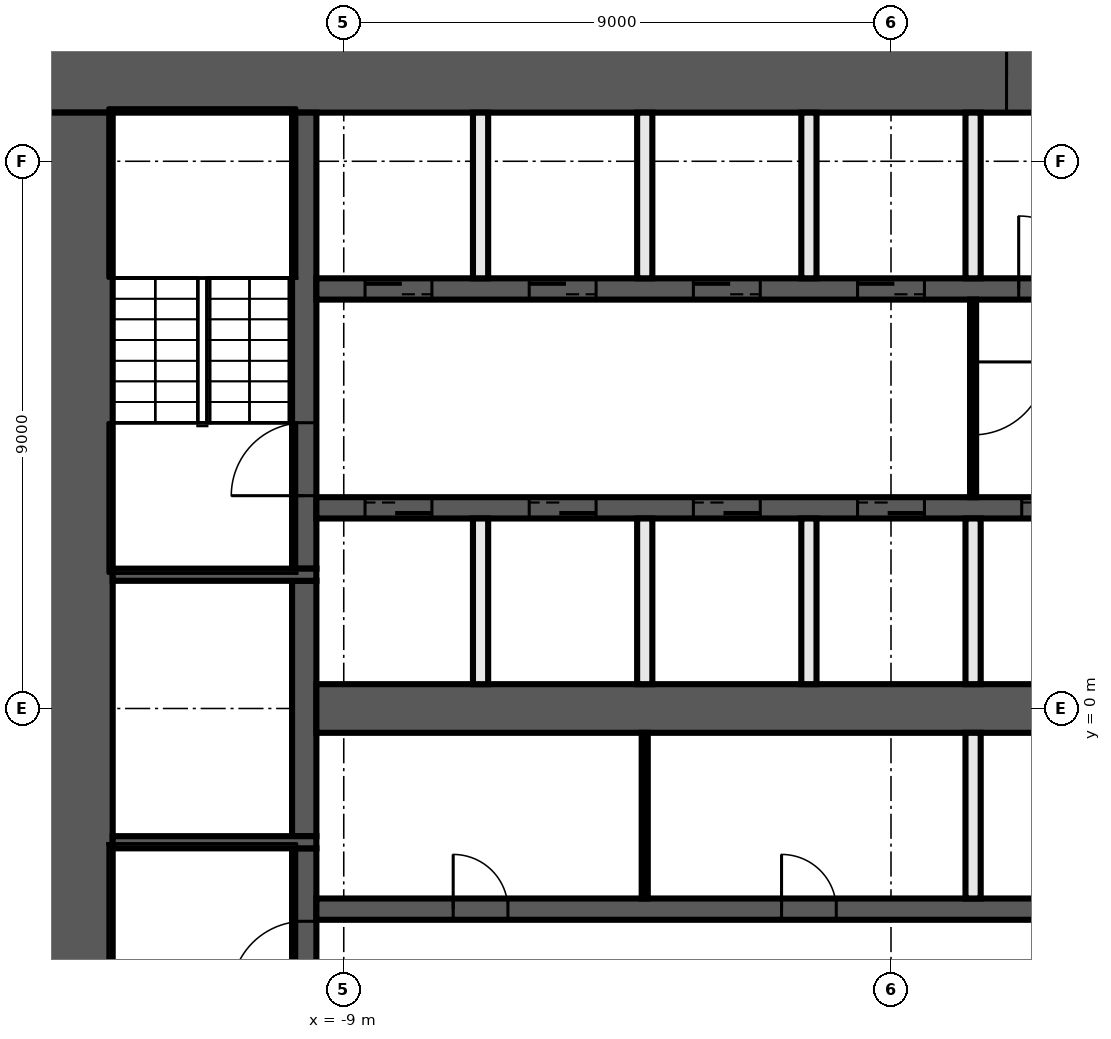
"""IFC4 building model, lengths in metres.
Left out: names, types, materials, properties, quantities, classifications, styles, units other than length and angle.
Written with IfcOpenShell. Run it as: python <this file> out.ifc"""

import sys

from ifc_helpers import new_model, si_unit, direction, frame, frame_2d, origin, place, context, subcontext, project, spatial, rectangle, extrude, element, fill, save


model = new_model("IFC4")
c1 = context("Model", 3, precision=1e-05, world=origin(), true_north=direction((0.0, 1.0)))
c2 = subcontext(c1, "Body", "Model", "MODEL_VIEW")
j1 = project(units=[si_unit("LENGTHUNIT", "METRE"), si_unit("PLANEANGLEUNIT", "RADIAN")], contexts=[c1])
p1 = place(None, origin())
s1 = spatial("IfcSite", under=j1, at=p1, CompositionType="ELEMENT")
p2 = place(p1, origin())
s2 = spatial("IfcBuilding", under=s1, at=p2, CompositionType="ELEMENT")
p3 = place(p2, frame((0.0, 0.0, 19.0)))
s3 = spatial("IfcBuildingStorey", under=s2, at=p3, CompositionType="ELEMENT", Elevation=19.0)
p4 = place(p3, frame((-14.0, 10.4, 0.0), z_axis=(0.0, 0.0, 1.0), x_axis=(1.0, 0.0, 0.0)))
e1 = element("IfcWall", 1, at=p4, inside=s3, PredefinedType="SHEAR", context=c2, shape_type="SweptSolid", body=[
    extrude(rectangle(XDim=28.0, YDim=1.2, at=frame_2d((14.0, 0.0))), origin(), (0.0, 0.0, 1.0), 7.55),
])
p5 = place(p4, frame((15.9, 0.0, 0.0)))
e2 = element("IfcOpeningElement", 2, at=p5, cuts=e1, PredefinedType="OPENING", context=c2, shape_type="SweptSolid", body=[
    extrude(rectangle(XDim=1.6, YDim=2.1, at=frame_2d((0.8, 1.05))), frame((0.0, 0.61, 0.0), z_axis=(0.0, -1.0, 0.0), x_axis=(1.0, 0.0, 0.0)), (0.0, 0.0, 1.0), 1.22),
])
p6 = place(p3, frame((-13.4, -9.8, 0.0), z_axis=(0.0, 0.0, 1.0), x_axis=(0.0, 1.0, 0.0)))
e3 = element("IfcWall", 3, at=p6, inside=s3, PredefinedType="SHEAR", context=c2, shape_type="SweptSolid", body=[
    extrude(rectangle(XDim=19.6, YDim=1.2, at=frame_2d((9.8, 0.0))), origin(), (0.0, 0.0, 1.0), 7.55),
])
p7 = place(p3, frame((-9.65, -9.8, 0.0), z_axis=(0.0, 0.0, 1.0), x_axis=(0.0, 1.0, 0.0)))
e4 = element("IfcWall", 4, at=p7, inside=s3, PredefinedType="SHEAR", context=c2, shape_type="SweptSolid", body=[
    extrude(rectangle(XDim=7.5, YDim=0.4, at=frame_2d((3.75, 0.0))), origin(), (0.0, 0.0, 1.0), 7.55),
])
p8 = place(p7, frame((5.1, 0.0, 0.0)))
e5 = element("IfcOpeningElement", 5, at=p8, cuts=e4, PredefinedType="OPENING", context=c2, shape_type="SweptSolid", body=[
    extrude(rectangle(XDim=1.2, YDim=2.1, at=frame_2d((0.6, 1.05))), frame((0.0, 0.21, 0.0), z_axis=(0.0, -1.0, 0.0), x_axis=(1.0, 0.0, 0.0)), (0.0, 0.0, 1.0), 0.42),
])
p9 = place(p3, frame((-9.65, -2.1, 0.0), z_axis=(0.0, 0.0, 1.0), x_axis=(0.0, 1.0, 0.0)))
e6 = element("IfcWall", 6, at=p9, inside=s3, PredefinedType="SHEAR", context=c2, shape_type="SweptSolid", body=[
    extrude(rectangle(XDim=4.2, YDim=0.4, at=frame_2d((2.1, 0.0))), origin(), (0.0, 0.0, 1.0), 7.55),
])
p10 = place(p3, frame((-9.65, 2.3, 0.0), z_axis=(0.0, 0.0, 1.0), x_axis=(0.0, 1.0, 0.0)))
e7 = element("IfcWall", 7, at=p10, inside=s3, PredefinedType="SHEAR", context=c2, shape_type="SweptSolid", body=[
    extrude(rectangle(XDim=7.5, YDim=0.4, at=frame_2d((3.75, 0.0))), origin(), (0.0, 0.0, 1.0), 7.55),
])
p11 = place(p10, frame((1.2, 0.0, 0.0)))
e8 = element("IfcOpeningElement", 8, at=p11, cuts=e7, PredefinedType="OPENING", context=c2, shape_type="SweptSolid", body=[
    extrude(rectangle(XDim=1.2, YDim=2.1, at=frame_2d((0.6, 1.05))), frame((0.0, 0.21, 0.0), z_axis=(0.0, -1.0, 0.0), x_axis=(1.0, 0.0, 0.0)), (0.0, 0.0, 1.0), 0.42),
])
for number, where, z_axis, x_axis in (
    (9, (-9.45, 2.2, 0.0), (0.0, 0.0, 1.0), (-1.0, 0.0, 0.0)),
    (10, (-9.45, -2.2, 0.0), (0.0, 0.0, 1.0), (-1.0, 0.0, 0.0)),
):
    element("IfcWall", number, at=place(p3, frame(where, z_axis=z_axis, x_axis=x_axis)), inside=s3, PredefinedType="SHEAR", context=c2, shape_type="SweptSolid", body=[
        extrude(rectangle(XDim=3.35, YDim=0.2, at=frame_2d((1.675, 0.0))), origin(), (0.0, 0.0, 1.0), 7.55),
    ])
p12 = place(p3, frame((-9.45, 6.9, 0.0), z_axis=(0.0, 0.0, 1.0), x_axis=(1.0, 0.0, 0.0)))
e11 = element("IfcWall", 11, at=p12, inside=s3, PredefinedType="SHEAR", context=c2, shape_type="SweptSolid", body=[
    extrude(rectangle(XDim=18.9, YDim=0.35, at=frame_2d((9.45, 0.0))), origin(), (0.0, 0.0, 1.0), 7.55),
])
p13 = place(p12, frame((0.8, 0.0, 0.0)))
e12 = element("IfcOpeningElement", 12, at=p13, cuts=e11, PredefinedType="OPENING", context=c2, shape_type="SweptSolid", body=[
    extrude(rectangle(XDim=1.1, YDim=2.1, at=frame_2d((0.55, 1.05))), frame((0.0, 0.185, 0.0), z_axis=(0.0, -1.0, 0.0), x_axis=(1.0, 0.0, 0.0)), (0.0, 0.0, 1.0), 0.37),
])
p14 = place(p12, frame((3.5, 0.0, 0.0)))
e13 = element("IfcOpeningElement", 13, at=p14, cuts=e11, PredefinedType="OPENING", context=c2, shape_type="SweptSolid", body=[
    extrude(rectangle(XDim=1.1, YDim=2.1, at=frame_2d((0.55, 1.05))), frame((0.0, 0.185, 0.0), z_axis=(0.0, -1.0, 0.0), x_axis=(1.0, 0.0, 0.0)), (0.0, 0.0, 1.0), 0.37),
])
p15 = place(p12, frame((6.2, 0.0, 0.0)))
e14 = element("IfcOpeningElement", 14, at=p15, cuts=e11, PredefinedType="OPENING", context=c2, shape_type="SweptSolid", body=[
    extrude(rectangle(XDim=1.1, YDim=2.1, at=frame_2d((0.55, 1.05))), frame((0.0, 0.185, 0.0), z_axis=(0.0, -1.0, 0.0), x_axis=(1.0, 0.0, 0.0)), (0.0, 0.0, 1.0), 0.37),
])
p16 = place(p12, frame((8.9, 0.0, 0.0)))
e15 = element("IfcOpeningElement", 15, at=p16, cuts=e11, PredefinedType="OPENING", context=c2, shape_type="SweptSolid", body=[
    extrude(rectangle(XDim=1.1, YDim=2.1, at=frame_2d((0.55, 1.05))), frame((0.0, 0.185, 0.0), z_axis=(0.0, -1.0, 0.0), x_axis=(1.0, 0.0, 0.0)), (0.0, 0.0, 1.0), 0.37),
])
p17 = place(p12, frame((11.55, 0.0, 0.0)))
e16 = element("IfcOpeningElement", 16, at=p17, cuts=e11, PredefinedType="OPENING", context=c2, shape_type="SweptSolid", body=[
    extrude(rectangle(XDim=1.2, YDim=2.1, at=frame_2d((0.6, 1.05))), frame((0.0, 0.185, 0.0), z_axis=(0.0, -1.0, 0.0), x_axis=(1.0, 0.0, 0.0)), (0.0, 0.0, 1.0), 0.37),
])
p18 = place(p12, frame((14.3, 0.0, 0.0)))
e17 = element("IfcOpeningElement", 17, at=p18, cuts=e11, PredefinedType="OPENING", context=c2, shape_type="SweptSolid", body=[
    extrude(rectangle(XDim=1.1, YDim=2.1, at=frame_2d((0.55, 1.05))), frame((0.0, 0.185, 0.0), z_axis=(0.0, -1.0, 0.0), x_axis=(1.0, 0.0, 0.0)), (0.0, 0.0, 1.0), 0.37),
])
p19 = place(p12, frame((17.0, 0.0, 0.0)))
e18 = element("IfcOpeningElement", 18, at=p19, cuts=e11, PredefinedType="OPENING", context=c2, shape_type="SweptSolid", body=[
    extrude(rectangle(XDim=1.1, YDim=2.1, at=frame_2d((0.55, 1.05))), frame((0.0, 0.185, 0.0), z_axis=(0.0, -1.0, 0.0), x_axis=(1.0, 0.0, 0.0)), (0.0, 0.0, 1.0), 0.37),
])
p20 = place(p3, frame((9.45, 3.3, 0.0), z_axis=(0.0, 0.0, 1.0), x_axis=(-1.0, 0.0, 0.0)))
e19 = element("IfcWall", 19, at=p20, inside=s3, PredefinedType="SHEAR", context=c2, shape_type="SweptSolid", body=[
    extrude(rectangle(XDim=18.9, YDim=0.35, at=frame_2d((9.45, 0.0))), origin(), (0.0, 0.0, 1.0), 7.55),
])
p21 = place(p20, frame((17.0, 0.0, 0.0)))
e20 = element("IfcOpeningElement", 20, at=p21, cuts=e19, PredefinedType="OPENING", context=c2, shape_type="SweptSolid", body=[
    extrude(rectangle(XDim=1.1, YDim=2.1, at=frame_2d((0.55, 1.05))), frame((0.0, 0.185, 0.0), z_axis=(0.0, -1.0, 0.0), x_axis=(1.0, 0.0, 0.0)), (0.0, 0.0, 1.0), 0.37),
])
p22 = place(p20, frame((14.3, 0.0, 0.0)))
e21 = element("IfcOpeningElement", 21, at=p22, cuts=e19, PredefinedType="OPENING", context=c2, shape_type="SweptSolid", body=[
    extrude(rectangle(XDim=1.1, YDim=2.1, at=frame_2d((0.55, 1.05))), frame((0.0, 0.185, 0.0), z_axis=(0.0, -1.0, 0.0), x_axis=(1.0, 0.0, 0.0)), (0.0, 0.0, 1.0), 0.37),
])
p23 = place(p20, frame((11.6, 0.0, 0.0)))
e22 = element("IfcOpeningElement", 22, at=p23, cuts=e19, PredefinedType="OPENING", context=c2, shape_type="SweptSolid", body=[
    extrude(rectangle(XDim=1.1, YDim=2.1, at=frame_2d((0.55, 1.05))), frame((0.0, 0.185, 0.0), z_axis=(0.0, -1.0, 0.0), x_axis=(1.0, 0.0, 0.0)), (0.0, 0.0, 1.0), 0.37),
])
p24 = place(p20, frame((8.9, 0.0, 0.0)))
e23 = element("IfcOpeningElement", 23, at=p24, cuts=e19, PredefinedType="OPENING", context=c2, shape_type="SweptSolid", body=[
    extrude(rectangle(XDim=1.1, YDim=2.1, at=frame_2d((0.55, 1.05))), frame((0.0, 0.185, 0.0), z_axis=(0.0, -1.0, 0.0), x_axis=(1.0, 0.0, 0.0)), (0.0, 0.0, 1.0), 0.37),
])
p25 = place(p20, frame((6.2, 0.0, 0.0)))
e24 = element("IfcOpeningElement", 24, at=p25, cuts=e19, PredefinedType="OPENING", context=c2, shape_type="SweptSolid", body=[
    extrude(rectangle(XDim=1.1, YDim=2.1, at=frame_2d((0.55, 1.05))), frame((0.0, 0.185, 0.0), z_axis=(0.0, -1.0, 0.0), x_axis=(1.0, 0.0, 0.0)), (0.0, 0.0, 1.0), 0.37),
])
p26 = place(p20, frame((3.5, 0.0, 0.0)))
e25 = element("IfcOpeningElement", 25, at=p26, cuts=e19, PredefinedType="OPENING", context=c2, shape_type="SweptSolid", body=[
    extrude(rectangle(XDim=1.1, YDim=2.1, at=frame_2d((0.55, 1.05))), frame((0.0, 0.185, 0.0), z_axis=(0.0, -1.0, 0.0), x_axis=(1.0, 0.0, 0.0)), (0.0, 0.0, 1.0), 0.37),
])
p27 = place(p20, frame((0.9, 0.0, 0.0)))
e26 = element("IfcOpeningElement", 26, at=p27, cuts=e19, PredefinedType="OPENING", context=c2, shape_type="SweptSolid", body=[
    extrude(rectangle(XDim=0.9, YDim=2.1, at=frame_2d((0.45, 1.05))), frame((0.0, 0.185, 0.0), z_axis=(0.0, -1.0, 0.0), x_axis=(1.0, 0.0, 0.0)), (0.0, 0.0, 1.0), 0.37),
])
p28 = place(p3, frame((-9.45, -3.3, 0.0), z_axis=(0.0, 0.0, 1.0), x_axis=(1.0, 0.0, 0.0)))
e27 = element("IfcWall", 27, at=p28, inside=s3, PredefinedType="SHEAR", context=c2, shape_type="SweptSolid", body=[
    extrude(rectangle(XDim=18.9, YDim=0.35, at=frame_2d((9.45, 0.0))), origin(), (0.0, 0.0, 1.0), 7.55),
])
p29 = place(p28, frame((17.0, 0.0, 0.0)))
e28 = element("IfcOpeningElement", 28, at=p29, cuts=e27, PredefinedType="OPENING", context=c2, shape_type="SweptSolid", body=[
    extrude(rectangle(XDim=1.1, YDim=2.1, at=frame_2d((0.55, 1.05))), frame((0.0, 0.185, 0.0), z_axis=(0.0, -1.0, 0.0), x_axis=(1.0, 0.0, 0.0)), (0.0, 0.0, 1.0), 0.37),
])
p30 = place(p28, frame((2.25, 0.0, 0.0)))
e29 = element("IfcOpeningElement", 29, at=p30, cuts=e27, PredefinedType="OPENING", context=c2, shape_type="SweptSolid", body=[
    extrude(rectangle(XDim=0.9, YDim=2.1, at=frame_2d((0.45, 1.05))), frame((0.0, 0.185, 0.0), z_axis=(0.0, -1.0, 0.0), x_axis=(1.0, 0.0, 0.0)), (0.0, 0.0, 1.0), 0.37),
])
p31 = place(p28, frame((7.65, 0.0, 0.0)))
e30 = element("IfcOpeningElement", 30, at=p31, cuts=e27, PredefinedType="OPENING", context=c2, shape_type="SweptSolid", body=[
    extrude(rectangle(XDim=0.9, YDim=2.1, at=frame_2d((0.45, 1.05))), frame((0.0, 0.185, 0.0), z_axis=(0.0, -1.0, 0.0), x_axis=(1.0, 0.0, 0.0)), (0.0, 0.0, 1.0), 0.37),
])
p32 = place(p3, frame((-9.45, 0.0, 0.0), z_axis=(0.0, 0.0, 1.0), x_axis=(1.0, 0.0, 0.0)))
e31 = element("IfcWall", 31, at=p32, inside=s3, PredefinedType="SHEAR", context=c2, shape_type="SweptSolid", body=[
    extrude(rectangle(XDim=18.9, YDim=0.8, at=frame_2d((9.45, 0.0))), origin(), (0.0, 0.0, 1.0), 7.55),
])
p33 = place(p3, frame((1.35, 6.725, 0.0), z_axis=(0.0, 0.0, 1.0), x_axis=(0.0, -1.0, 0.0)))
e32 = element("IfcWall", 32, at=p33, inside=s3, PredefinedType="PARTITIONING", context=c2, shape_type="SweptSolid", body=[
    extrude(rectangle(XDim=3.25, YDim=0.1, at=frame_2d((1.625, 0.0))), origin(), (0.0, 0.0, 1.0), 7.55),
])
p34 = place(p33, frame((1.025, 0.0, 0.0)))
e33 = element("IfcOpeningElement", 33, at=p34, cuts=e32, PredefinedType="OPENING", context=c2, shape_type="SweptSolid", body=[
    extrude(rectangle(XDim=1.2, YDim=2.1, at=frame_2d((0.6, 1.05))), frame((0.0, 0.06, 0.0), z_axis=(0.0, -1.0, 0.0), x_axis=(1.0, 0.0, 0.0)), (0.0, 0.0, 1.0), 0.12),
])
for number, where, z_axis, x_axis in (
    (34, (1.35, -3.125, 0.0), (0.0, 0.0, 1.0), (0.0, 1.0, 0.0)),
    (35, (1.35, 0.4, 0.0), (0.0, 0.0, 1.0), (0.0, 1.0, 0.0)),
    (36, (1.35, 7.075, 0.0), (0.0, 0.0, 1.0), (0.0, 1.0, 0.0)),
    (37, (-1.35, 0.4, 0.0), (0.0, 0.0, 1.0), (0.0, 1.0, 0.0)),
    (38, (-1.35, 7.075, 0.0), (0.0, 0.0, 1.0), (0.0, 1.0, 0.0)),
):
    element("IfcWall", number, at=place(p3, frame(where, z_axis=z_axis, x_axis=x_axis)), inside=s3, PredefinedType="SOLIDWALL", context=c2, shape_type="SweptSolid", body=[
        extrude(rectangle(XDim=2.725, YDim=0.25, at=frame_2d((1.363, 0.0))), origin(), (0.0, 0.0, 1.0), 7.55),
    ])
p35 = place(p3, frame((-4.05, -3.125, 0.0), z_axis=(0.0, 0.0, 1.0), x_axis=(0.0, 1.0, 0.0)))
e39 = element("IfcWall", 39, at=p35, inside=s3, PredefinedType="PARTITIONING", context=c2, shape_type="SweptSolid", body=[
    extrude(rectangle(XDim=2.725, YDim=0.1, at=frame_2d((1.363, 0.0))), origin(), (0.0, 0.0, 1.0), 7.55),
])
for number, where, z_axis, x_axis in (
    (40, (-4.05, 0.4, 0.0), (0.0, 0.0, 1.0), (0.0, 1.0, 0.0)),
    (41, (-4.05, 7.075, 0.0), (0.0, 0.0, 1.0), (0.0, 1.0, 0.0)),
    (42, (-6.75, 0.4, 0.0), (0.0, 0.0, 1.0), (0.0, 1.0, 0.0)),
    (43, (-6.75, 7.075, 0.0), (0.0, 0.0, 1.0), (0.0, 1.0, 0.0)),
):
    element("IfcWall", number, at=place(p3, frame(where, z_axis=z_axis, x_axis=x_axis)), inside=s3, PredefinedType="SOLIDWALL", context=c2, shape_type="SweptSolid", body=[
        extrude(rectangle(XDim=2.725, YDim=0.25, at=frame_2d((1.363, 0.0))), origin(), (0.0, 0.0, 1.0), 7.55),
    ])
p36 = place(p13, origin())
e44 = element("IfcDoor", 44, at=p36, inside=s3, OperationType="DOUBLE_DOOR_SLIDING", PredefinedType="DOOR", context=c2, shape_type="SweptSolid", body=[
    extrude(rectangle(XDim=1.1, YDim=2.1, at=frame_2d((0.55, 1.05))), frame((0.0, 0.025, 0.0), z_axis=(0.0, -1.0, 0.0), x_axis=(1.0, 0.0, 0.0)), (0.0, 0.0, 1.0), 0.05),
])
fill(e12, e44)
p37 = place(p14, origin())
e45 = element("IfcDoor", 45, at=p37, inside=s3, OperationType="DOUBLE_DOOR_SLIDING", PredefinedType="DOOR", context=c2, shape_type="SweptSolid", body=[
    extrude(rectangle(XDim=1.1, YDim=2.1, at=frame_2d((0.55, 1.05))), frame((0.0, 0.025, 0.0), z_axis=(0.0, -1.0, 0.0), x_axis=(1.0, 0.0, 0.0)), (0.0, 0.0, 1.0), 0.05),
])
fill(e13, e45)
p38 = place(p15, origin())
e46 = element("IfcDoor", 46, at=p38, inside=s3, OperationType="DOUBLE_DOOR_SLIDING", PredefinedType="DOOR", context=c2, shape_type="SweptSolid", body=[
    extrude(rectangle(XDim=1.1, YDim=2.1, at=frame_2d((0.55, 1.05))), frame((0.0, 0.025, 0.0), z_axis=(0.0, -1.0, 0.0), x_axis=(1.0, 0.0, 0.0)), (0.0, 0.0, 1.0), 0.05),
])
fill(e14, e46)
p39 = place(p16, origin())
e47 = element("IfcDoor", 47, at=p39, inside=s3, OperationType="DOUBLE_DOOR_SLIDING", PredefinedType="DOOR", context=c2, shape_type="SweptSolid", body=[
    extrude(rectangle(XDim=1.1, YDim=2.1, at=frame_2d((0.55, 1.05))), frame((0.0, 0.025, 0.0), z_axis=(0.0, -1.0, 0.0), x_axis=(1.0, 0.0, 0.0)), (0.0, 0.0, 1.0), 0.05),
])
fill(e15, e47)
p40 = place(p5, origin())
e48 = element("IfcDoor", 48, at=p40, inside=s3, OperationType="DOUBLE_DOOR_SINGLE_SWING", PredefinedType="DOOR", context=c2, shape_type="SweptSolid", body=[
    extrude(rectangle(XDim=1.6, YDim=2.1, at=frame_2d((0.8, 1.05))), frame((0.0, 0.025, 0.0), z_axis=(0.0, -1.0, 0.0), x_axis=(1.0, 0.0, 0.0)), (0.0, 0.0, 1.0), 0.05),
])
fill(e2, e48)
p41 = place(p17, origin())
e49 = element("IfcDoor", 49, at=p41, inside=s3, OperationType="SINGLE_SWING_LEFT", PredefinedType="DOOR", context=c2, shape_type="SweptSolid", body=[
    extrude(rectangle(XDim=1.2, YDim=2.1, at=frame_2d((0.6, 1.05))), frame((0.0, 0.025, 0.0), z_axis=(0.0, -1.0, 0.0), x_axis=(1.0, 0.0, 0.0)), (0.0, 0.0, 1.0), 0.05),
])
fill(e16, e49)
p42 = place(p21, origin())
e50 = element("IfcDoor", 50, at=p42, inside=s3, OperationType="DOUBLE_DOOR_SLIDING", PredefinedType="DOOR", context=c2, shape_type="SweptSolid", body=[
    extrude(rectangle(XDim=1.1, YDim=2.1, at=frame_2d((0.55, 1.05))), frame((0.0, 0.025, 0.0), z_axis=(0.0, -1.0, 0.0), x_axis=(1.0, 0.0, 0.0)), (0.0, 0.0, 1.0), 0.05),
])
fill(e20, e50)
p43 = place(p22, origin())
e51 = element("IfcDoor", 51, at=p43, inside=s3, OperationType="DOUBLE_DOOR_SLIDING", PredefinedType="DOOR", context=c2, shape_type="SweptSolid", body=[
    extrude(rectangle(XDim=1.1, YDim=2.1, at=frame_2d((0.55, 1.05))), frame((0.0, 0.025, 0.0), z_axis=(0.0, -1.0, 0.0), x_axis=(1.0, 0.0, 0.0)), (0.0, 0.0, 1.0), 0.05),
])
fill(e21, e51)
p44 = place(p23, origin())
e52 = element("IfcDoor", 52, at=p44, inside=s3, OperationType="DOUBLE_DOOR_SLIDING", PredefinedType="DOOR", context=c2, shape_type="SweptSolid", body=[
    extrude(rectangle(XDim=1.1, YDim=2.1, at=frame_2d((0.55, 1.05))), frame((0.0, 0.025, 0.0), z_axis=(0.0, -1.0, 0.0), x_axis=(1.0, 0.0, 0.0)), (0.0, 0.0, 1.0), 0.05),
])
fill(e22, e52)
p45 = place(p24, origin())
e53 = element("IfcDoor", 53, at=p45, inside=s3, OperationType="DOUBLE_DOOR_SLIDING", PredefinedType="DOOR", context=c2, shape_type="SweptSolid", body=[
    extrude(rectangle(XDim=1.1, YDim=2.1, at=frame_2d((0.55, 1.05))), frame((0.0, 0.025, 0.0), z_axis=(0.0, -1.0, 0.0), x_axis=(1.0, 0.0, 0.0)), (0.0, 0.0, 1.0), 0.05),
])
fill(e23, e53)
p46 = place(p25, origin())
e54 = element("IfcDoor", 54, at=p46, inside=s3, OperationType="DOUBLE_DOOR_SLIDING", PredefinedType="DOOR", context=c2, shape_type="SweptSolid", body=[
    extrude(rectangle(XDim=1.1, YDim=2.1, at=frame_2d((0.55, 1.05))), frame((0.0, 0.025, 0.0), z_axis=(0.0, -1.0, 0.0), x_axis=(1.0, 0.0, 0.0)), (0.0, 0.0, 1.0), 0.05),
])
fill(e24, e54)
p47 = place(p30, origin())
e55 = element("IfcDoor", 55, at=p47, inside=s3, OperationType="SINGLE_SWING_RIGHT", PredefinedType="DOOR", context=c2, shape_type="SweptSolid", body=[
    extrude(rectangle(XDim=0.9, YDim=2.1, at=frame_2d((0.45, 1.05))), frame((0.0, 0.025, 0.0), z_axis=(0.0, -1.0, 0.0), x_axis=(1.0, 0.0, 0.0)), (0.0, 0.0, 1.0), 0.05),
])
fill(e29, e55)
p48 = place(p31, origin())
e56 = element("IfcDoor", 56, at=p48, inside=s3, OperationType="SINGLE_SWING_LEFT", PredefinedType="DOOR", context=c2, shape_type="SweptSolid", body=[
    extrude(rectangle(XDim=0.9, YDim=2.1, at=frame_2d((0.45, 1.05))), frame((0.0, 0.025, 0.0), z_axis=(0.0, -1.0, 0.0), x_axis=(1.0, 0.0, 0.0)), (0.0, 0.0, 1.0), 0.05),
])
fill(e30, e56)
p49 = place(p11, origin())
e57 = element("IfcDoor", 57, at=p49, inside=s3, OperationType="SINGLE_SWING_RIGHT", PredefinedType="DOOR", context=c2, shape_type="SweptSolid", body=[
    extrude(rectangle(XDim=1.2, YDim=2.1, at=frame_2d((0.6, 1.05))), frame((0.0, 0.025, 0.0), z_axis=(0.0, -1.0, 0.0), x_axis=(1.0, 0.0, 0.0)), (0.0, 0.0, 1.0), 0.05),
])
fill(e8, e57)
p50 = place(p8, origin())
e58 = element("IfcDoor", 58, at=p50, inside=s3, OperationType="SINGLE_SWING_LEFT", PredefinedType="DOOR", context=c2, shape_type="SweptSolid", body=[
    extrude(rectangle(XDim=1.2, YDim=2.1, at=frame_2d((0.6, 1.05))), frame((0.0, 0.025, 0.0), z_axis=(0.0, -1.0, 0.0), x_axis=(1.0, 0.0, 0.0)), (0.0, 0.0, 1.0), 0.05),
])
fill(e5, e58)
p51 = place(p34, origin())
e59 = element("IfcDoor", 59, at=p51, inside=s3, OperationType="SINGLE_SWING_LEFT", PredefinedType="DOOR", context=c2, shape_type="SweptSolid", body=[
    extrude(rectangle(XDim=1.2, YDim=2.1, at=frame_2d((0.6, 1.05))), frame((0.0, 0.025, 0.0), z_axis=(0.0, -1.0, 0.0), x_axis=(1.0, 0.0, 0.0)), (0.0, 0.0, 1.0), 0.05),
])
fill(e33, e59)
save(model, sys.argv[1])
